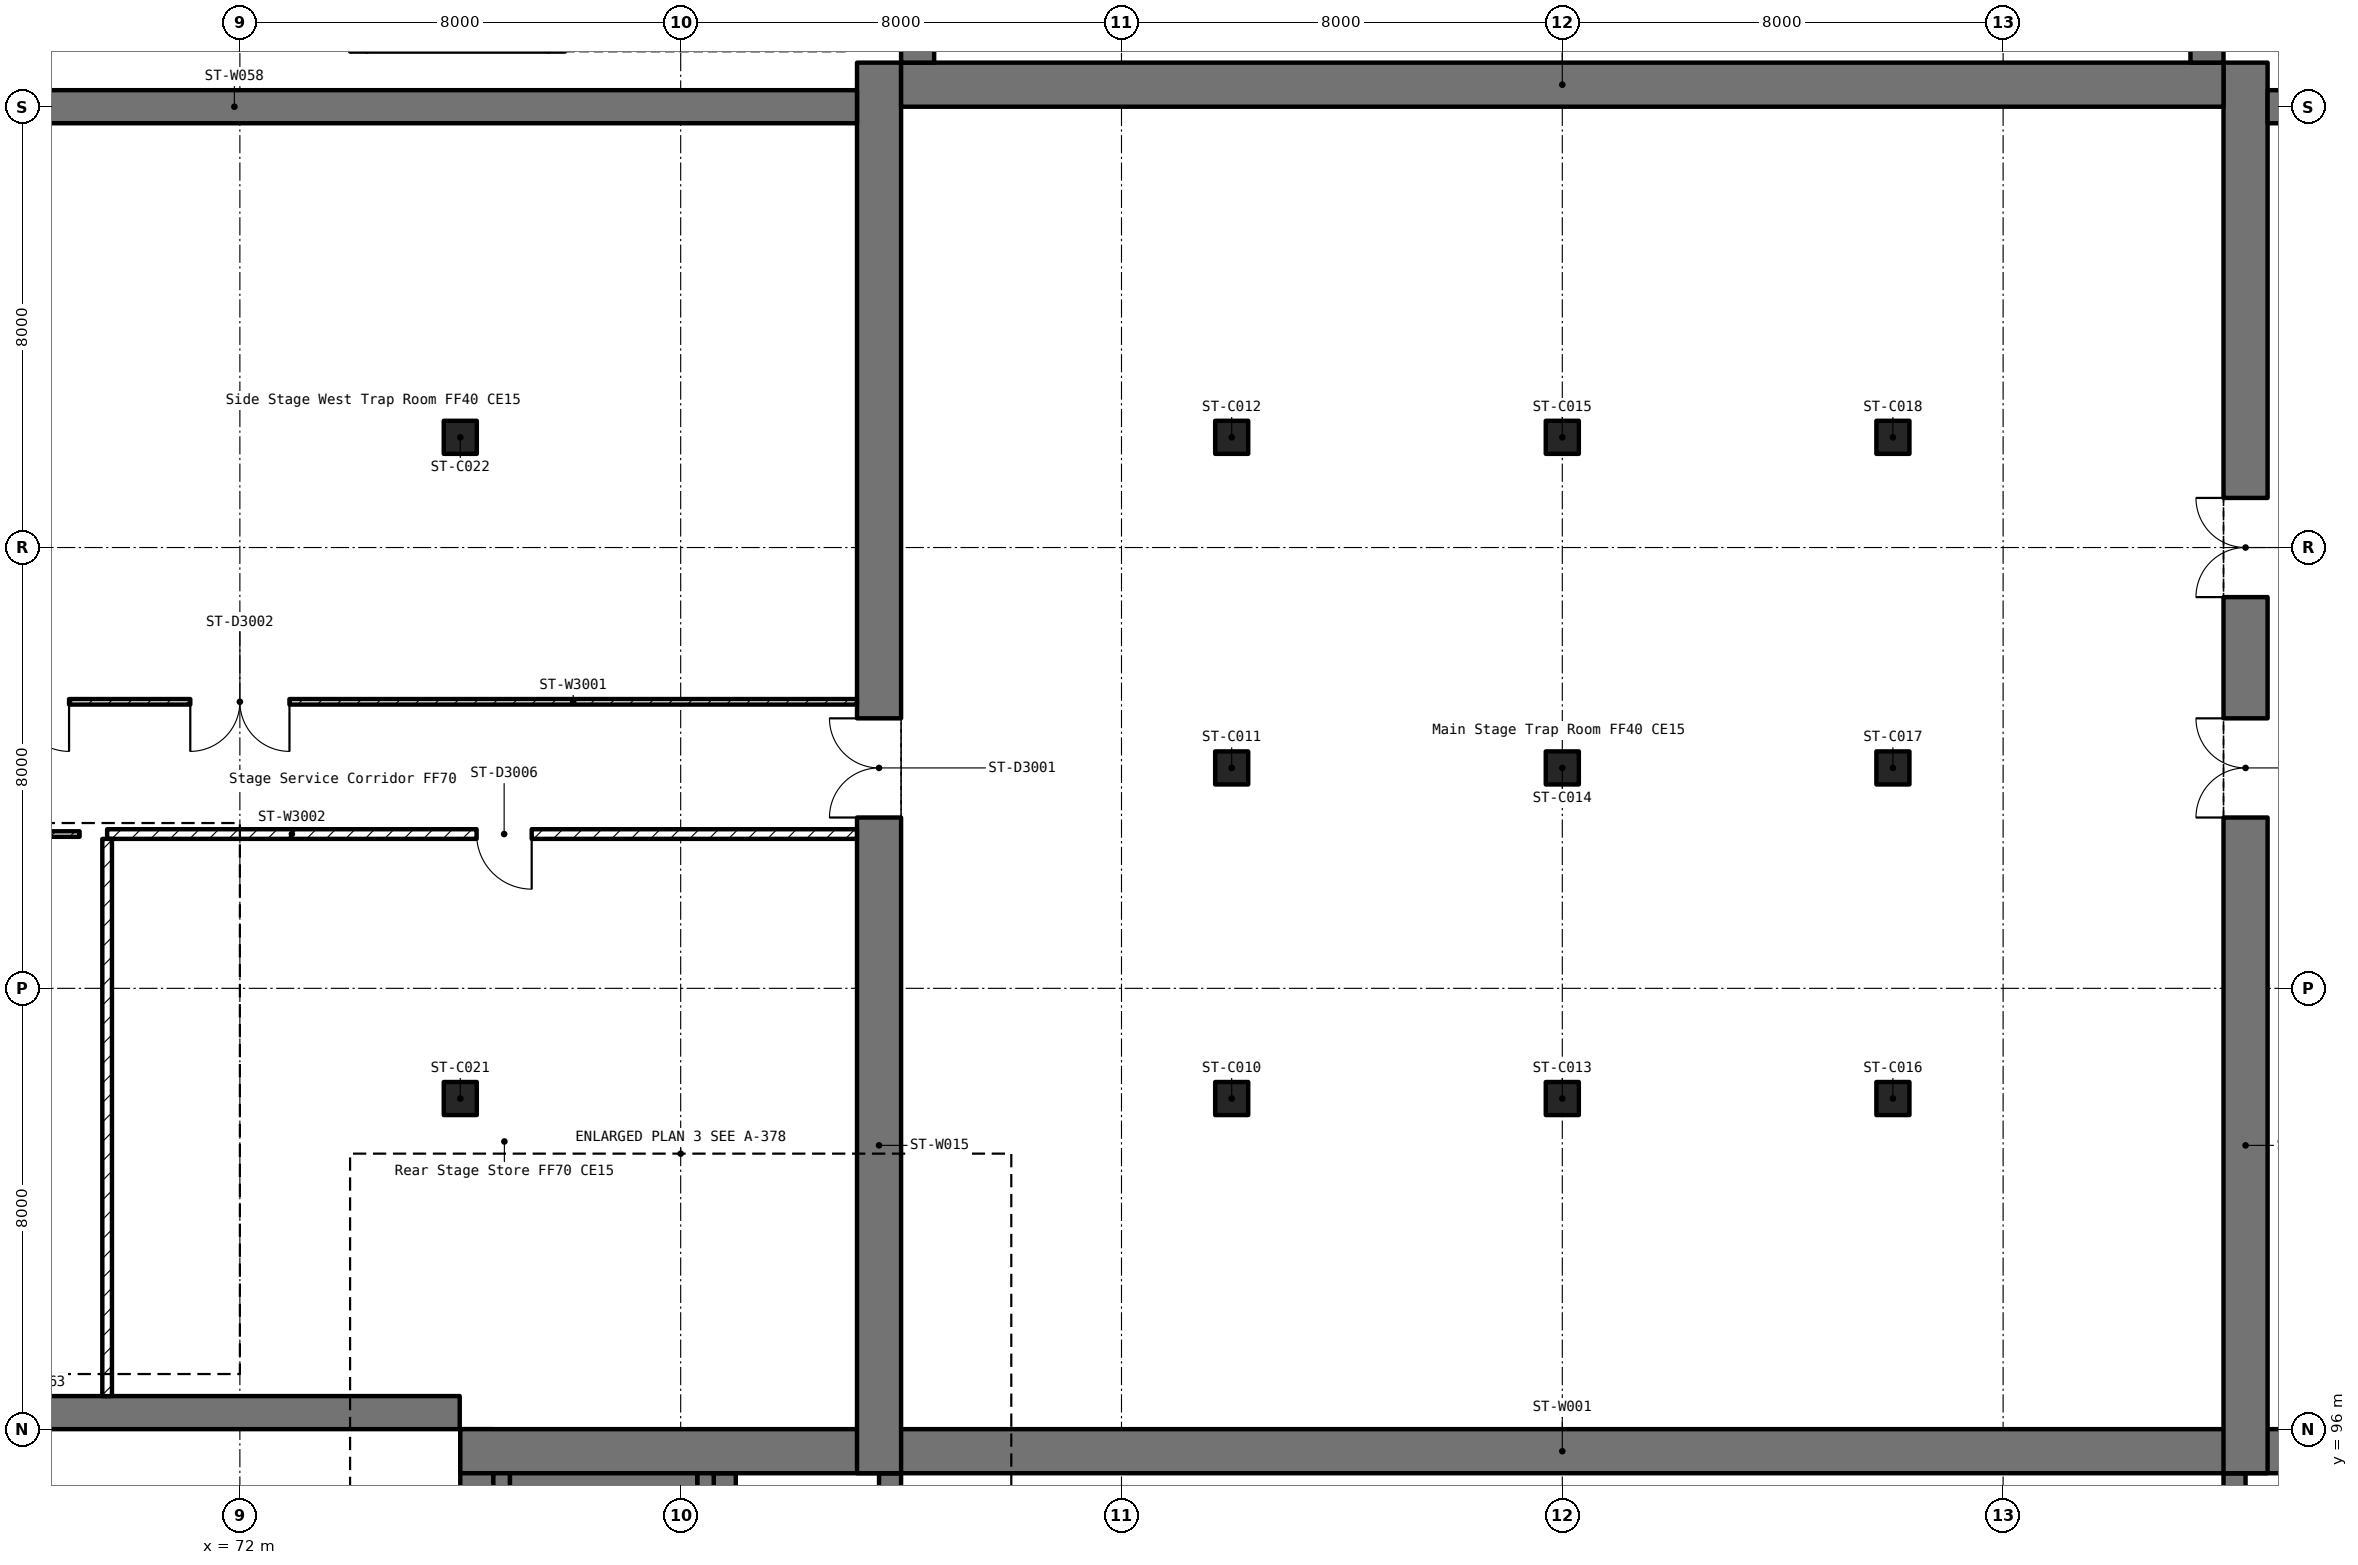
"""IFC4 building model, lengths in metres.
Left out: names, types, materials, properties, quantities, classifications, styles, units other than length and angle.
Written with IfcOpenShell. Run it as: python <this file> out.ifc"""

import sys

from ifc_helpers import new_model, si_unit, direction, frame, frame_2d, origin, origin_2d, place, context, subcontext, project, spatial, rectangle, extrude, element, fill, save


model = new_model("IFC4")
c1 = context("Model", 3, precision=1e-05, world=origin(), true_north=direction((0.0, 1.0)))
c2 = subcontext(c1, "Body", "Model", "MODEL_VIEW")
j1 = project(units=[si_unit("LENGTHUNIT", "METRE"), si_unit("PLANEANGLEUNIT", "RADIAN")], contexts=[c1])
p1 = place(None, origin())
s1 = spatial("IfcSite", under=j1, at=p1, CompositionType="ELEMENT")
p2 = place(p1, origin())
s2 = spatial("IfcBuilding", under=s1, at=p2, CompositionType="ELEMENT")
p3 = place(p2, frame((0.0, 0.0, -6.0)))
s3 = spatial("IfcBuildingStorey", under=s2, at=p3, CompositionType="ELEMENT", Elevation=-6.0)
p4 = place(p3, frame((76.3, 64.0, -0.3), z_axis=(0.0, 0.0, 1.0), x_axis=(0.0, 1.0, 0.0)))
e1 = element("IfcWall", 1, at=p4, inside=s3, PredefinedType="SHEAR", context=c2, shape_type="SweptSolid", body=[
    extrude(rectangle(XDim=32.0, YDim=0.6, at=frame_2d((16.0, 0.0))), origin(), (0.0, 0.0, 1.0), 6.3),
])
p5 = place(p3, frame((80.8, 95.2, -0.3), z_axis=(0.0, 0.0, 1.0), x_axis=(0.0, -1.0, 0.0)))
e2 = element("IfcWall", 2, at=p5, inside=s3, PredefinedType="SHEAR", context=c2, shape_type="SweptSolid", body=[
    extrude(rectangle(XDim=11.213, YDim=0.4, at=frame_2d((5.606, 0.0))), origin(), (0.0, 0.0, 1.0), 6.3),
])
for number, where, z_axis, x_axis in (
    (3, (83.8, 87.8, 0.0), (0.0, 0.0, 1.0), (0.0, 1.0, 0.0)),
    (4, (108.2, 87.8, 0.0), (0.0, 0.0, 1.0), (0.0, 1.0, 0.0)),
):
    element("IfcWall", number, at=place(p3, frame(where, z_axis=z_axis, x_axis=x_axis)), inside=s3, PredefinedType="SHEAR", context=c2, shape_type="SweptSolid", body=[
        extrude(rectangle(XDim=7.4, YDim=0.4, at=frame_2d((3.7, 0.0))), origin(), (0.0, 0.0, 1.0), 4.2),
    ])
p6 = place(p3, frame((76.0, 95.6, 0.0), z_axis=(0.0, 0.0, 1.0), x_axis=(1.0, 0.0, 0.0)))
e5 = element("IfcWall", 5, at=p6, inside=s3, PredefinedType="SHEAR", context=c2, shape_type="SweptSolid", body=[
    extrude(rectangle(XDim=40.0, YDim=0.8, at=frame_2d((20.0, 0.0))), origin(), (0.0, 0.0, 1.0), 6.0),
])
p7 = place(p3, frame((83.6, 95.2, 0.0), z_axis=(0.0, 0.0, 1.0), x_axis=(0.0, 1.0, 0.0)))
e6 = element("IfcWall", 6, at=p7, inside=s3, PredefinedType="SHEAR", context=c2, shape_type="SweptSolid", body=[
    extrude(rectangle(XDim=25.6, YDim=0.8, at=frame_2d((12.8, 0.0))), origin(), (0.0, 0.0, 1.0), 6.0),
])
p8 = place(p7, frame((11.9, 0.0, 0.0)))
e7 = element("IfcOpeningElement", 7, at=p8, cuts=e6, PredefinedType="OPENING", context=c2, shape_type="SweptSolid", body=[
    extrude(rectangle(XDim=1.8, YDim=2.1, at=frame_2d((0.9, 1.05))), frame((0.0, 0.412, 0.0), z_axis=(0.0, -1.0, 0.0), x_axis=(1.0, 0.0, 0.0)), (0.0, 0.0, 1.0), 0.824),
])
p9 = place(p3, frame((108.4, 95.2, 0.0), z_axis=(0.0, 0.0, 1.0), x_axis=(0.0, 1.0, 0.0)))
e8 = element("IfcWall", 8, at=p9, inside=s3, PredefinedType="SHEAR", context=c2, shape_type="SweptSolid", body=[
    extrude(rectangle(XDim=25.6, YDim=0.8, at=frame_2d((12.8, 0.0))), origin(), (0.0, 0.0, 1.0), 6.0),
])
p10 = place(p9, frame((11.9, 0.0, 0.0)))
e9 = element("IfcOpeningElement", 9, at=p10, cuts=e8, PredefinedType="OPENING", context=c2, shape_type="SweptSolid", body=[
    extrude(rectangle(XDim=1.8, YDim=2.1, at=frame_2d((0.9, 1.05))), frame((0.0, 0.412, 0.0), z_axis=(0.0, -1.0, 0.0), x_axis=(1.0, 0.0, 0.0)), (0.0, 0.0, 1.0), 0.824),
])
p11 = place(p9, frame((15.9, 0.0, 0.0)))
e10 = element("IfcOpeningElement", 10, at=p11, cuts=e8, PredefinedType="OPENING", context=c2, shape_type="SweptSolid", body=[
    extrude(rectangle(XDim=1.8, YDim=2.1, at=frame_2d((0.9, 1.05))), frame((0.0, 0.412, 0.0), z_axis=(0.0, -1.0, 0.0), x_axis=(1.0, 0.0, 0.0)), (0.0, 0.0, 1.0), 0.824),
])
p12 = place(p3, frame((84.0, 120.4, 0.0), z_axis=(0.0, 0.0, 1.0), x_axis=(1.0, 0.0, 0.0)))
e11 = element("IfcWall", 11, at=p12, inside=s3, PredefinedType="SHEAR", context=c2, shape_type="SweptSolid", body=[
    extrude(rectangle(XDim=24.0, YDim=0.8, at=frame_2d((12.0, 0.0))), origin(), (0.0, 0.0, 1.0), 6.0),
])
p13 = place(p3, frame((60.6, 120.0, -0.3), z_axis=(0.0, 0.0, 1.0), x_axis=(1.0, 0.0, 0.0)))
e12 = element("IfcWall", 12, at=p13, inside=s3, PredefinedType="SHEAR", context=c2, shape_type="SweptSolid", body=[
    extrude(rectangle(XDim=22.6, YDim=0.6, at=frame_2d((11.3, 0.0))), origin(), (0.0, 0.0, 1.0), 6.3),
])
p14 = place(p3, frame((60.6, 96.3, -0.3), z_axis=(0.0, 0.0, 1.0), x_axis=(1.0, 0.0, 0.0)))
e13 = element("IfcWall", 13, at=p14, inside=s3, PredefinedType="SHEAR", context=c2, shape_type="SweptSolid", body=[
    extrude(rectangle(XDim=15.39, YDim=0.6, at=frame_2d((7.695, 0.0))), origin(), (0.0, 0.0, 1.0), 6.3),
])
p15 = place(p3, frame((108.8, 120.0, -0.3), z_axis=(0.0, 0.0, 1.0), x_axis=(1.0, 0.0, 0.0)))
e14 = element("IfcWall", 14, at=p15, inside=s3, PredefinedType="SHEAR", context=c2, shape_type="SweptSolid", body=[
    extrude(rectangle(XDim=22.6, YDim=0.6, at=frame_2d((11.3, 0.0))), origin(), (0.0, 0.0, 1.0), 6.3),
])
for number, where, z_axis, x_axis in (
    (15, (84.3, 120.8, -0.3), (0.0, 0.0, 1.0), (0.0, 1.0, 0.0)),
    (16, (107.7, 120.8, -0.3), (0.0, 0.0, 1.0), (0.0, 1.0, 0.0)),
):
    element("IfcWall", number, at=place(p3, frame(where, z_axis=z_axis, x_axis=x_axis)), inside=s3, PredefinedType="SHEAR", context=c2, shape_type="SweptSolid", body=[
        extrude(rectangle(XDim=15.2, YDim=0.6, at=frame_2d((7.6, 0.0))), origin(), (0.0, 0.0, 1.0), 6.3),
    ])
for number, where, z_axis, x_axis in (
    (17, (90.0, 102.0, 0.0), (0.0, 0.0, 1.0), (1.0, 0.0, 0.0)),
    (18, (90.0, 108.0, 0.0), (0.0, 0.0, 1.0), (1.0, 0.0, 0.0)),
    (19, (90.0, 114.0, 0.0), (0.0, 0.0, 1.0), (1.0, 0.0, 0.0)),
    (20, (96.0, 102.0, 0.0), (0.0, 0.0, 1.0), (1.0, 0.0, 0.0)),
    (21, (96.0, 108.0, 0.0), (0.0, 0.0, 1.0), (1.0, 0.0, 0.0)),
    (22, (96.0, 114.0, 0.0), (0.0, 0.0, 1.0), (1.0, 0.0, 0.0)),
    (23, (102.0, 102.0, 0.0), (0.0, 0.0, 1.0), (1.0, 0.0, 0.0)),
    (24, (102.0, 108.0, 0.0), (0.0, 0.0, 1.0), (1.0, 0.0, 0.0)),
    (25, (102.0, 114.0, 0.0), (0.0, 0.0, 1.0), (1.0, 0.0, 0.0)),
    (26, (76.0, 102.0, 0.0), (0.0, 0.0, 1.0), (1.0, 0.0, 0.0)),
    (27, (76.0, 114.0, 0.0), (0.0, 0.0, 1.0), (1.0, 0.0, 0.0)),
):
    element("IfcColumn", number, at=place(p3, frame(where, z_axis=z_axis, x_axis=x_axis)), inside=s3, PredefinedType="COLUMN", context=c2, shape_type="SweptSolid", body=[
        extrude(rectangle(XDim=0.6, YDim=0.6, at=origin_2d()), origin(), (0.0, 0.0, 1.0), 6.0),
    ])
p16 = place(p3, frame((80.45, 85.0, 0.0), z_axis=(0.0, 0.0, 1.0), x_axis=(0.0, 1.0, 0.0)))
e28 = element("IfcWall", 28, at=p16, inside=s3, PredefinedType="SOLIDWALL", context=c2, shape_type="SweptSolid", body=[
    extrude(rectangle(XDim=10.2, YDim=0.3, at=frame_2d((5.1, 0.0))), origin(), (0.0, 0.0, 1.0), 6.0),
])
p17 = place(p3, frame((80.3, 95.05, 0.0), z_axis=(0.0, 0.0, 1.0), x_axis=(-1.0, 0.0, 0.0)))
e29 = element("IfcWall", 29, at=p17, inside=s3, PredefinedType="SOLIDWALL", context=c2, shape_type="SweptSolid", body=[
    extrude(rectangle(XDim=3.4, YDim=0.3, at=frame_2d((1.7, 0.0))), origin(), (0.0, 0.0, 1.0), 6.0),
])
p18 = place(p3, frame((76.75, 95.2, 0.0), z_axis=(0.0, 0.0, 1.0), x_axis=(0.0, -1.0, 0.0)))
e30 = element("IfcWall", 30, at=p18, inside=s3, PredefinedType="SOLIDWALL", context=c2, shape_type="SweptSolid", body=[
    extrude(rectangle(XDim=10.2, YDim=0.3, at=frame_2d((5.1, 0.0))), origin(), (0.0, 0.0, 1.0), 6.0),
])
p19 = place(p3, frame((74.3, 121.15, 0.0), z_axis=(0.0, 0.0, 1.0), x_axis=(1.0, 0.0, 0.0)))
e31 = element("IfcWall", 31, at=p19, inside=s3, PredefinedType="SOLIDWALL", context=c2, shape_type="SweptSolid", body=[
    extrude(rectangle(XDim=3.3, YDim=0.3, at=frame_2d((1.65, 0.0))), origin(), (0.0, 0.0, 1.0), 6.0),
])
p20 = place(p3, frame((83.199, 109.2, 0.0), z_axis=(0.0, 0.0, 1.0), x_axis=(-1.0, 0.0, 0.0)))
e32 = element("IfcWall", 32, at=p20, inside=s3, PredefinedType="PARTITIONING", context=c2, shape_type="SweptSolid", body=[
    extrude(rectangle(XDim=22.599, YDim=0.1, at=frame_2d((11.299, 0.0))), origin(), (0.0, 0.0, 1.0), 4.8),
])
p21 = place(p20, frame((10.299, 0.0, 0.0)))
e33 = element("IfcOpeningElement", 33, at=p21, cuts=e32, PredefinedType="OPENING", context=c2, shape_type="SweptSolid", body=[
    extrude(rectangle(XDim=1.8, YDim=2.1, at=frame_2d((0.9, 1.05))), frame((0.0, 0.062, 0.0), z_axis=(0.0, -1.0, 0.0), x_axis=(1.0, 0.0, 0.0)), (0.0, 0.0, 1.0), 0.124),
])
p22 = place(p20, frame((14.299, 0.0, 0.0)))
e34 = element("IfcOpeningElement", 34, at=p22, cuts=e32, PredefinedType="OPENING", context=c2, shape_type="SweptSolid", body=[
    extrude(rectangle(XDim=1.8, YDim=2.1, at=frame_2d((0.9, 1.05))), frame((0.0, 0.062, 0.0), z_axis=(0.0, -1.0, 0.0), x_axis=(1.0, 0.0, 0.0)), (0.0, 0.0, 1.0), 0.124),
])
p23 = place(p3, frame((83.199, 106.8, 0.0), z_axis=(0.0, 0.0, 1.0), x_axis=(-1.0, 0.0, 0.0)))
e35 = element("IfcWall", 35, at=p23, inside=s3, PredefinedType="PARTITIONING", context=c2, shape_type="SweptSolid", body=[
    extrude(rectangle(XDim=13.608, YDim=0.175, at=frame_2d((6.804, 0.0))), origin(), (0.0, 0.0, 1.0), 4.8),
])
p24 = place(p23, frame((5.903, 0.0, 0.0)))
e36 = element("IfcOpeningElement", 36, at=p24, cuts=e35, PredefinedType="OPENING", context=c2, shape_type="SweptSolid", body=[
    extrude(rectangle(XDim=1.0, YDim=2.1, at=frame_2d((0.5, 1.05))), frame((0.0, 0.1, 0.0), z_axis=(0.0, -1.0, 0.0), x_axis=(1.0, 0.0, 0.0)), (0.0, 0.0, 1.0), 0.199),
])
p25 = place(p3, frame((69.591, 96.6, 0.0), z_axis=(0.0, 0.0, 1.0), x_axis=(0.0, 1.0, 0.0)))
e37 = element("IfcWall", 37, at=p25, inside=s3, PredefinedType="PARTITIONING", context=c2, shape_type="SweptSolid", body=[
    extrude(rectangle(XDim=10.112, YDim=0.175, at=frame_2d((5.056, 0.0))), origin(), (0.0, 0.0, 1.0), 4.8),
])
p26 = place(p3, frame((69.091, 106.8, 0.0), z_axis=(0.0, 0.0, 1.0), x_axis=(-1.0, 0.0, 0.0)))
e38 = element("IfcWall", 38, at=p26, inside=s3, PredefinedType="PARTITIONING", context=c2, shape_type="SweptSolid", body=[
    extrude(rectangle(XDim=8.491, YDim=0.1, at=frame_2d((4.246, 0.0))), origin(), (0.0, 0.0, 1.0), 4.8),
])
p27 = place(p26, frame((3.795, 0.0, 0.0)))
e39 = element("IfcOpeningElement", 39, at=p27, cuts=e38, PredefinedType="OPENING", context=c2, shape_type="SweptSolid", body=[
    extrude(rectangle(XDim=1.0, YDim=2.1, at=frame_2d((0.5, 1.05))), frame((0.0, 0.062, 0.0), z_axis=(0.0, -1.0, 0.0), x_axis=(1.0, 0.0, 0.0)), (0.0, 0.0, 1.0), 0.124),
])
p28 = place(p8, origin())
e40 = element("IfcDoor", 40, at=p28, inside=s3, OperationType="DOUBLE_DOOR_SINGLE_SWING", PredefinedType="DOOR", context=c2, shape_type="SweptSolid", body=[
    extrude(rectangle(XDim=1.8, YDim=2.1, at=frame_2d((0.9, 1.05))), frame((0.0, 0.025, 0.0), z_axis=(0.0, -1.0, 0.0), x_axis=(1.0, 0.0, 0.0)), (0.0, 0.0, 1.0), 0.05),
])
fill(e7, e40)
p29 = place(p21, origin())
e41 = element("IfcDoor", 41, at=p29, inside=s3, OperationType="DOUBLE_DOOR_SINGLE_SWING", PredefinedType="DOOR", context=c2, shape_type="SweptSolid", body=[
    extrude(rectangle(XDim=1.8, YDim=2.1, at=frame_2d((0.9, 1.05))), frame((0.0, 0.025, 0.0), z_axis=(0.0, -1.0, 0.0), x_axis=(1.0, 0.0, 0.0)), (0.0, 0.0, 1.0), 0.05),
])
fill(e33, e41)
p30 = place(p22, origin())
e42 = element("IfcDoor", 42, at=p30, inside=s3, OperationType="DOUBLE_DOOR_SINGLE_SWING", PredefinedType="DOOR", context=c2, shape_type="SweptSolid", body=[
    extrude(rectangle(XDim=1.8, YDim=2.1, at=frame_2d((0.9, 1.05))), frame((0.0, 0.025, 0.0), z_axis=(0.0, -1.0, 0.0), x_axis=(1.0, 0.0, 0.0)), (0.0, 0.0, 1.0), 0.05),
])
fill(e34, e42)
p31 = place(p10, origin())
e43 = element("IfcDoor", 43, at=p31, inside=s3, OperationType="DOUBLE_DOOR_SINGLE_SWING", PredefinedType="DOOR", context=c2, shape_type="SweptSolid", body=[
    extrude(rectangle(XDim=1.8, YDim=2.1, at=frame_2d((0.9, 1.05))), frame((0.0, 0.025, 0.0), z_axis=(0.0, -1.0, 0.0), x_axis=(1.0, 0.0, 0.0)), (0.0, 0.0, 1.0), 0.05),
])
fill(e9, e43)
p32 = place(p11, origin())
e44 = element("IfcDoor", 44, at=p32, inside=s3, OperationType="DOUBLE_DOOR_SINGLE_SWING", PredefinedType="DOOR", context=c2, shape_type="SweptSolid", body=[
    extrude(rectangle(XDim=1.8, YDim=2.1, at=frame_2d((0.9, 1.05))), frame((0.0, 0.025, 0.0), z_axis=(0.0, -1.0, 0.0), x_axis=(1.0, 0.0, 0.0)), (0.0, 0.0, 1.0), 0.05),
])
fill(e10, e44)
p33 = place(p24, origin())
e45 = element("IfcDoor", 45, at=p33, inside=s3, OperationType="SINGLE_SWING_LEFT", PredefinedType="DOOR", context=c2, shape_type="SweptSolid", body=[
    extrude(rectangle(XDim=1.0, YDim=2.1, at=frame_2d((0.5, 1.05))), frame((0.0, 0.025, 0.0), z_axis=(0.0, -1.0, 0.0), x_axis=(1.0, 0.0, 0.0)), (0.0, 0.0, 1.0), 0.05),
])
fill(e36, e45)
save(model, sys.argv[1])
